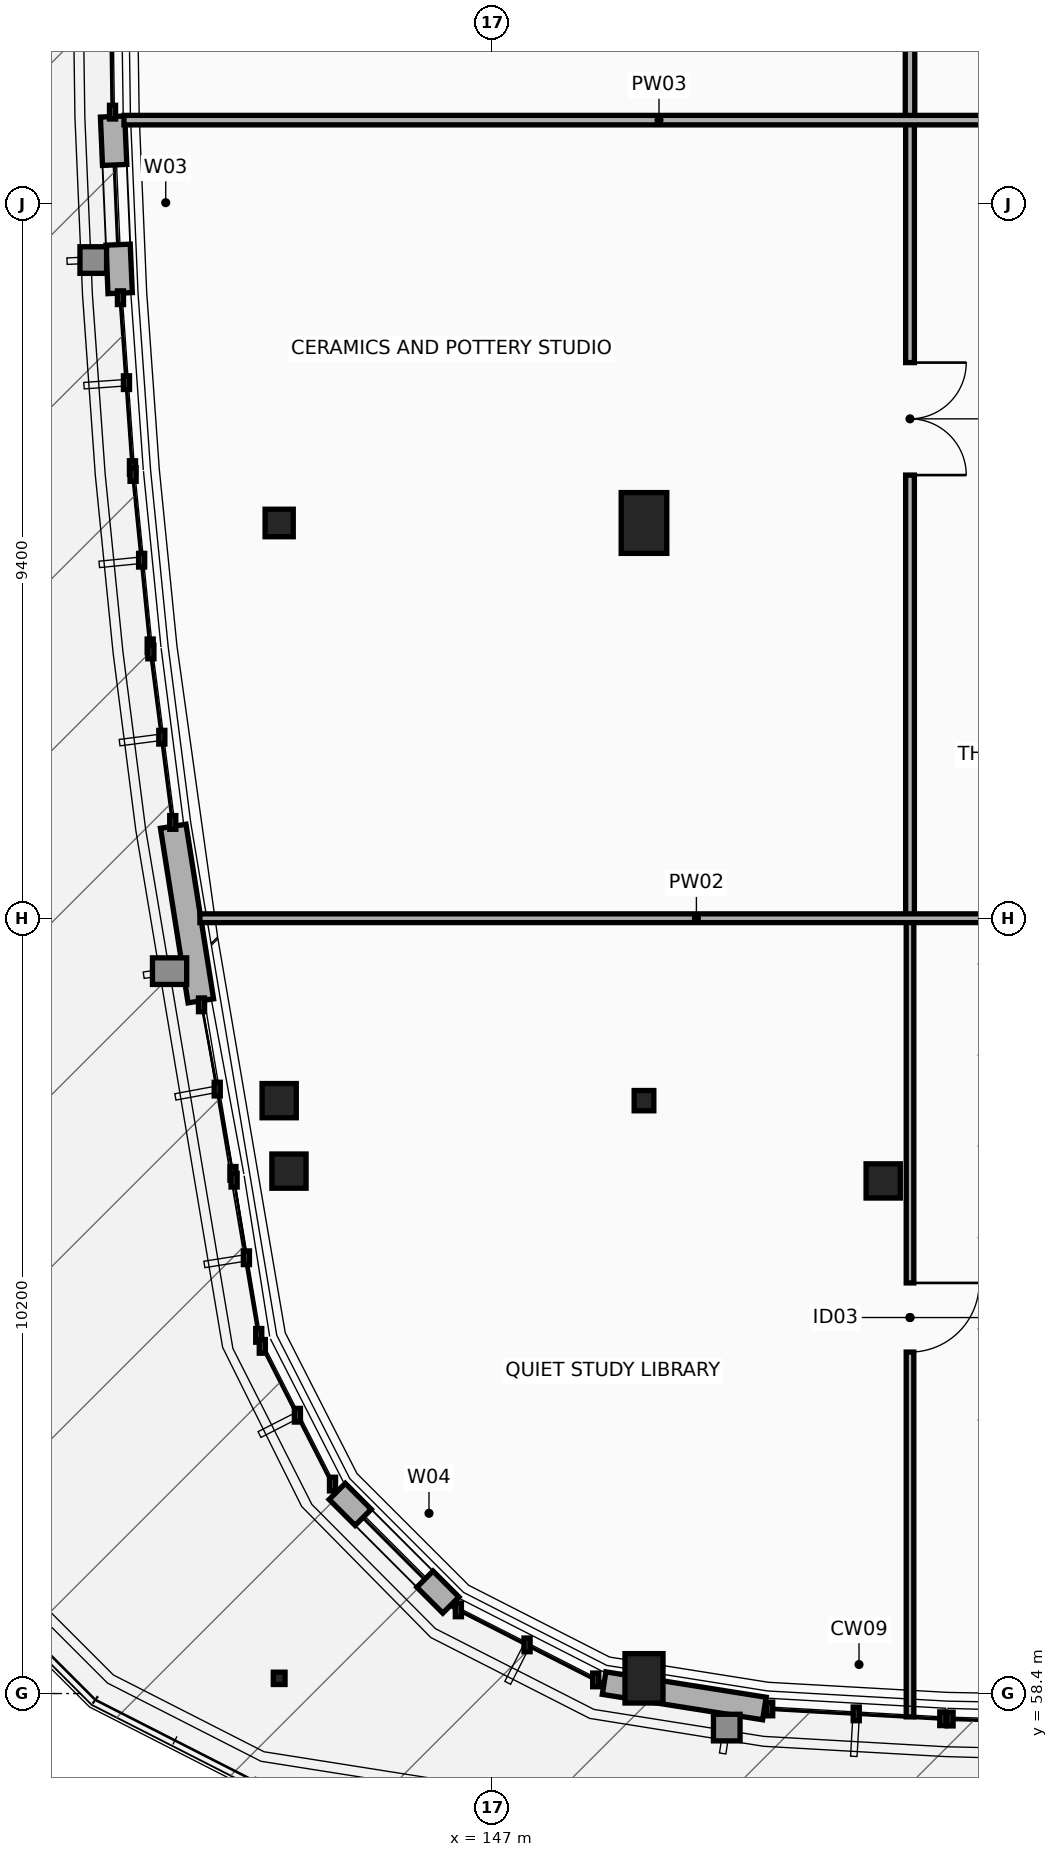
"""IFC4 building model, lengths in metres.
Left out: names, types, materials, properties, quantities, classifications, styles, units other than length and angle.
Written with IfcOpenShell. Run it as: python <this file> out.ifc"""

import sys

from ifc_helpers import new_model, si_unit, direction, frame, frame_2d, origin, origin_2d, place, context, subcontext, project, spatial, rectangle, i_section, extrude, element, fill, save


model = new_model("IFC4")
c1 = context("Model", 3, precision=1e-05, world=origin(), true_north=direction((0.0, 1.0)))
c2 = subcontext(c1, "Body", "Model", "MODEL_VIEW")
j1 = project(units=[si_unit("LENGTHUNIT", "METRE"), si_unit("PLANEANGLEUNIT", "RADIAN")], contexts=[c1])
p1 = place(None, origin())
s1 = spatial("IfcSite", under=j1, at=p1, CompositionType="ELEMENT")
p2 = place(p1, origin())
s2 = spatial("IfcBuilding", under=s1, at=p2, CompositionType="ELEMENT")
p3 = place(p2, frame((0.0, 0.0, 12.6)))
s3 = spatial("IfcBuildingStorey", under=s2, at=p3, CompositionType="ELEMENT", Elevation=12.6)
p4 = place(p3, frame((144.2, 58.6, 0.0), z_axis=(0.0, 0.0, 1.0), x_axis=(1.0, 0.0, 0.0)))
e1 = element("IfcColumn", 1, at=p4, inside=s3, PredefinedType="COLUMN", context=c2, shape_type="SweptSolid", body=[
    extrude(i_section(OverallWidth=0.154, OverallDepth=0.162, WebThickness=0.008, FlangeThickness=0.011, at=origin_2d()), origin(), (0.0, 0.0, 1.0), 3.6),
])
p5 = place(p3, frame((144.2, 66.2, 0.0), z_axis=(0.0, 0.0, 1.0), x_axis=(1.0, 0.0, 0.0)))
e2 = element("IfcColumn", 2, at=p5, inside=s3, PredefinedType="COLUMN", context=c2, shape_type="SweptSolid", body=[
    extrude(rectangle(XDim=0.45, YDim=0.45, at=origin_2d()), origin(), (0.0, 0.0, 1.0), 3.6),
])
p6 = place(p3, frame((144.2, 73.8, 0.0), z_axis=(0.0, 0.0, 1.0), x_axis=(1.0, 0.0, 0.0)))
e3 = element("IfcColumn", 3, at=p6, inside=s3, PredefinedType="COLUMN", context=c2, shape_type="SweptSolid", body=[
    extrude(i_section(OverallWidth=0.371, OverallDepth=0.362, WebThickness=0.012, FlangeThickness=0.021, at=origin_2d()), origin(), (0.0, 0.0, 1.0), 3.6),
])
p7 = place(p3, frame((149.0, 58.6, 0.0), z_axis=(0.0, 0.0, 1.0), x_axis=(1.0, 0.0, 0.0)))
e4 = element("IfcColumn", 4, at=p7, inside=s3, PredefinedType="COLUMN", context=c2, shape_type="SweptSolid", body=[
    extrude(rectangle(XDim=0.5, YDim=0.65, at=origin_2d()), origin(), (0.0, 0.0, 1.0), 3.6),
])
p8 = place(p3, frame((149.0, 66.2, 0.0), z_axis=(0.0, 0.0, 1.0), x_axis=(1.0, 0.0, 0.0)))
e5 = element("IfcColumn", 5, at=p8, inside=s3, PredefinedType="COLUMN", context=c2, shape_type="SweptSolid", body=[
    extrude(i_section(OverallWidth=0.259, OverallDepth=0.267, WebThickness=0.013, FlangeThickness=0.021, at=origin_2d()), origin(), (0.0, 0.0, 1.0), 3.6),
])
p9 = place(p3, frame((149.0, 73.8, 0.0), z_axis=(0.0, 0.0, 1.0), x_axis=(1.0, 0.0, 0.0)))
e6 = element("IfcColumn", 6, at=p9, inside=s3, PredefinedType="COLUMN", context=c2, shape_type="SweptSolid", body=[
    extrude(rectangle(XDim=0.6, YDim=0.8, at=origin_2d()), origin(), (0.0, 0.0, 1.0), 3.6),
])
p10 = place(p3, frame((144.329, 65.273, 0.0), z_axis=(0.0, 0.0, 1.0), x_axis=(1.0, 0.0, 0.0)))
e7 = element("IfcColumn", 7, at=p10, inside=s3, PredefinedType="COLUMN", context=c2, shape_type="SweptSolid", body=[
    extrude(rectangle(XDim=0.45, YDim=0.45, at=origin_2d()), origin(), (0.0, 0.0, 1.0), 3.353),
])
p11 = place(p3, frame((152.147, 65.144, 0.0), z_axis=(0.0, 0.0, 1.0), x_axis=(1.0, 0.0, 0.0)))
e8 = element("IfcColumn", 8, at=p11, inside=s3, PredefinedType="COLUMN", context=c2, shape_type="SweptSolid", body=[
    extrude(rectangle(XDim=0.45, YDim=0.45, at=origin_2d()), origin(), (0.0, 0.0, 1.0), 3.6),
])
p12 = place(p3, frame((142.108, 76.824, 0.0), z_axis=(0.0, 0.0, 1.0), x_axis=(-0.0429451046, 0.999077433431, 0.0)))
e9 = element("IfcWall", 9, at=p12, inside=s3, PredefinedType="STANDARD", context=c2, shape_type="SweptSolid", body=[
    extrude(rectangle(XDim=2.325, YDim=0.32, at=frame_2d((1.163, 0.0))), origin(), (0.0, 0.0, 1.0), 3.337),
])
p13 = place(p12, frame((0.638, 0.0, 0.9)))
e10 = element("IfcOpeningElement", 10, at=p13, cuts=e9, PredefinedType="OPENING", context=c2, shape_type="SweptSolid", body=[
    extrude(rectangle(XDim=1.05, YDim=1.65, at=frame_2d((0.525, 0.825))), frame((0.0, 0.17, 0.0), z_axis=(0.0, -1.0, 0.0), x_axis=(1.0, 0.0, 0.0)), (0.0, 0.0, 1.0), 0.34),
])
p14 = place(p3, frame((143.169, 67.513, 0.0), z_axis=(0.0, 0.0, 1.0), x_axis=(-0.15610273212, 0.987740824824, 0.0)))
e11 = element("IfcWall", 11, at=p14, inside=s3, PredefinedType="STANDARD", context=c2, shape_type="SweptSolid", body=[
    extrude(rectangle(XDim=2.326, YDim=0.34, at=frame_2d((1.163, 0.0))), origin(), (0.0, 0.0, 1.0), 3.337),
])
p15 = place(p3, frame((146.459, 59.564, 0.0), z_axis=(0.0, 0.0, 1.0), x_axis=(-0.707049041687, 0.707164515971, 0.0)))
e12 = element("IfcWall", 12, at=p15, inside=s3, PredefinedType="STANDARD", context=c2, shape_type="SweptSolid", body=[
    extrude(rectangle(XDim=2.114, YDim=0.3, at=frame_2d((1.057, 0.0))), origin(), (0.0, 0.0, 1.0), 3.065),
])
p16 = place(p15, frame((0.482, 0.0, 0.9)))
e13 = element("IfcOpeningElement", 13, at=p16, cuts=e12, PredefinedType="OPENING", context=c2, shape_type="SweptSolid", body=[
    extrude(rectangle(XDim=1.15, YDim=1.75, at=frame_2d((0.575, 0.875))), frame((0.0, 0.16, 0.0), z_axis=(0.0, -1.0, 0.0), x_axis=(1.0, 0.0, 0.0)), (0.0, 0.0, 1.0), 0.32),
])
p17 = place(p3, frame((150.584, 58.203, 0.0), z_axis=(0.0, 0.0, 1.0), x_axis=(-0.987672873908, 0.156532086638, 0.0)))
e14 = element("IfcWall", 14, at=p17, inside=s3, PredefinedType="STANDARD", context=c2, shape_type="SweptSolid", body=[
    extrude(rectangle(XDim=2.135, YDim=0.3, at=frame_2d((1.068, 0.0))), origin(), (0.0, 0.0, 1.0), 2.792),
])
p18 = place(p3, frame((152.5, 68.6, 0.0), z_axis=(0.0, 0.0, 1.0), x_axis=(0.0, -1.0, 0.0)))
e15 = element("IfcWall", 15, at=p18, inside=s3, PredefinedType="PARTITIONING", context=c2, shape_type="SweptSolid", body=[
    extrude(rectangle(XDim=10.507, YDim=0.1, at=frame_2d((5.253, 0.0))), origin(), (0.0, 0.0, 1.0), 2.662),
])
p19 = place(p18, frame((4.798, 0.0, 0.0)))
e16 = element("IfcOpeningElement", 16, at=p19, cuts=e15, PredefinedType="OPENING", context=c2, shape_type="SweptSolid", body=[
    extrude(rectangle(XDim=0.91, YDim=2.1, at=frame_2d((0.455, 1.05))), frame((0.0, 0.06, 0.0), z_axis=(0.0, -1.0, 0.0), x_axis=(1.0, 0.0, 0.0)), (0.0, 0.0, 1.0), 0.12),
])
p20 = place(p3, frame((152.5, 79.1, 0.0), z_axis=(0.0, 0.0, 1.0), x_axis=(0.0, -1.0, 0.0)))
e17 = element("IfcWall", 17, at=p20, inside=s3, PredefinedType="PARTITIONING", context=c2, shape_type="SweptSolid", body=[
    extrude(rectangle(XDim=10.5, YDim=0.115, at=frame_2d((5.25, 0.0))), origin(), (0.0, 0.0, 1.0), 2.645),
])
p21 = place(p20, frame((3.19, 0.0, 0.0)))
e18 = element("IfcOpeningElement", 18, at=p21, cuts=e17, PredefinedType="OPENING", context=c2, shape_type="SweptSolid", body=[
    extrude(rectangle(XDim=1.48, YDim=2.22, at=frame_2d((0.74, 1.11))), frame((0.0, 0.067, 0.0), z_axis=(0.0, -1.0, 0.0), x_axis=(1.0, 0.0, 0.0)), (0.0, 0.0, 1.0), 0.135),
])
p22 = place(p3, frame((152.5, 88.9, 0.0), z_axis=(0.0, 0.0, 1.0), x_axis=(0.0, -1.0, 0.0)))
e19 = element("IfcWall", 19, at=p22, inside=s3, PredefinedType="PARTITIONING", context=c2, shape_type="SweptSolid", body=[
    extrude(rectangle(XDim=9.8, YDim=0.125, at=frame_2d((4.9, 0.0))), origin(), (0.0, 0.0, 1.0), 2.795),
])
p23 = place(p22, frame((4.02, 0.0, 0.0)))
e20 = element("IfcOpeningElement", 20, at=p23, cuts=e19, PredefinedType="OPENING", context=c2, shape_type="SweptSolid", body=[
    extrude(rectangle(XDim=1.76, YDim=2.52, at=frame_2d((0.88, 1.26))), frame((0.0, 0.073, 0.0), z_axis=(0.0, -1.0, 0.0), x_axis=(1.0, 0.0, 0.0)), (0.0, 0.0, 1.0), 0.145),
])
p24 = place(p3, frame((143.157, 68.6, 0.0), z_axis=(0.0, 0.0, 1.0), x_axis=(1.0, 0.0, 0.0)))
e21 = element("IfcWall", 21, at=p24, inside=s3, PredefinedType="PARTITIONING", context=c2, shape_type="SweptSolid", body=[
    extrude(rectangle(XDim=13.065, YDim=0.115, at=frame_2d((6.532, 0.0))), origin(), (0.0, 0.0, 1.0), 2.583),
])
p25 = place(p3, frame((142.158, 79.1, 0.0), z_axis=(0.0, 0.0, 1.0), x_axis=(1.0, 0.0, 0.0)))
e22 = element("IfcWall", 22, at=p25, inside=s3, PredefinedType="PARTITIONING", context=c2, shape_type="SweptSolid", body=[
    extrude(rectangle(XDim=14.079, YDim=0.125, at=frame_2d((7.04, 0.0))), origin(), (0.0, 0.0, 1.0), 2.806),
])
p26 = place(p13, origin())
e23 = element("IfcWindow", 23, at=p26, inside=s3, PartitioningType="SINGLE_PANEL", PredefinedType="WINDOW", context=c2, shape_type="SweptSolid", body=[
    extrude(rectangle(XDim=1.05, YDim=1.65, at=frame_2d((0.525, 0.825))), frame((0.0, 0.03, 0.0), z_axis=(0.0, -1.0, 0.0), x_axis=(1.0, 0.0, 0.0)), (0.0, 0.0, 1.0), 0.06),
])
fill(e10, e23)
p27 = place(p16, origin())
e24 = element("IfcWindow", 24, at=p27, inside=s3, PartitioningType="SINGLE_PANEL", PredefinedType="WINDOW", context=c2, shape_type="SweptSolid", body=[
    extrude(rectangle(XDim=1.15, YDim=1.75, at=frame_2d((0.575, 0.875))), frame((0.0, 0.03, 0.0), z_axis=(0.0, -1.0, 0.0), x_axis=(1.0, 0.0, 0.0)), (0.0, 0.0, 1.0), 0.06),
])
fill(e13, e24)
p28 = place(p19, origin())
e25 = element("IfcDoor", 25, at=p28, inside=s3, OperationType="SINGLE_SWING_LEFT", PredefinedType="DOOR", context=c2, shape_type="SweptSolid", body=[
    extrude(rectangle(XDim=0.91, YDim=2.1, at=frame_2d((0.455, 1.05))), frame((0.0, 0.025, 0.0), z_axis=(0.0, -1.0, 0.0), x_axis=(1.0, 0.0, 0.0)), (0.0, 0.0, 1.0), 0.05),
])
fill(e16, e25)
p29 = place(p21, origin())
e26 = element("IfcDoor", 26, at=p29, inside=s3, OperationType="DOUBLE_DOOR_SINGLE_SWING", PredefinedType="DOOR", context=c2, shape_type="SweptSolid", body=[
    extrude(rectangle(XDim=1.48, YDim=2.22, at=frame_2d((0.74, 1.11))), frame((0.0, 0.025, 0.0), z_axis=(0.0, -1.0, 0.0), x_axis=(1.0, 0.0, 0.0)), (0.0, 0.0, 1.0), 0.05),
])
fill(e18, e26)
save(model, sys.argv[1])
